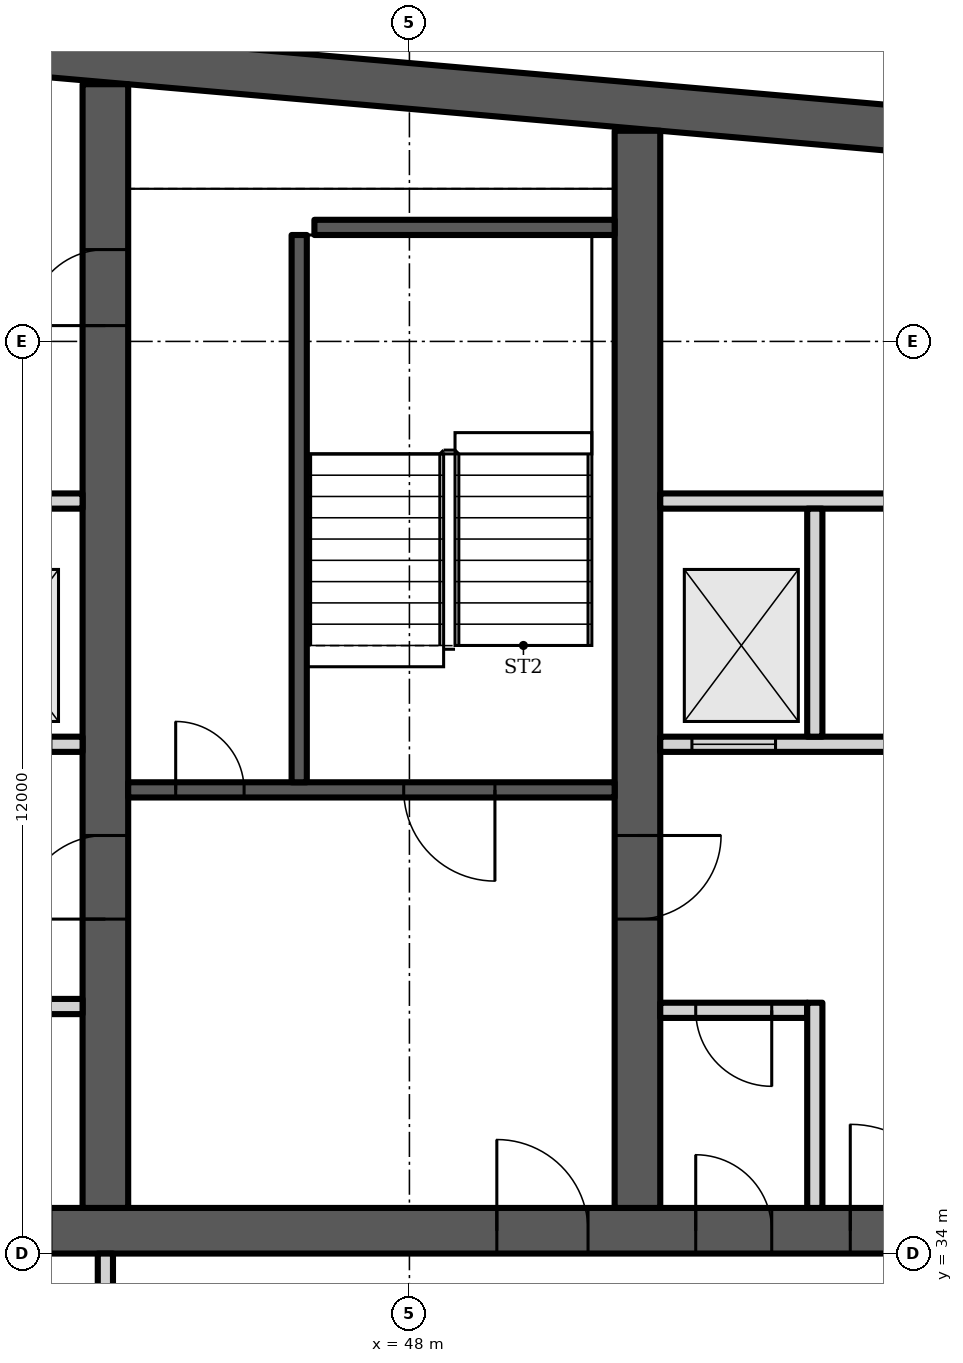
"""IFC4 building model, lengths in metres.
Left out: names, types, materials, properties, quantities, classifications, styles, units other than length and angle.
Written with IfcOpenShell. Run it as: python <this file> out.ifc"""

import sys

from ifc_helpers import new_model, si_unit, direction, frame, frame_2d, origin, place, context, subcontext, project, spatial, polyline, rectangle, outline, extrude, element, fill, save


model = new_model("IFC4")
c1 = context("Model", 3, precision=1e-05, world=origin(), true_north=direction((0.0, 1.0)))
c2 = subcontext(c1, "Body", "Model", "MODEL_VIEW")
j1 = project(units=[si_unit("LENGTHUNIT", "METRE"), si_unit("PLANEANGLEUNIT", "RADIAN")], contexts=[c1])
p1 = place(None, origin())
s1 = spatial("IfcSite", under=j1, at=p1, CompositionType="ELEMENT")
p2 = place(p1, origin())
s2 = spatial("IfcBuilding", under=s1, at=p2, CompositionType="ELEMENT")
p3 = place(p2, frame((0.0, 0.0, 232.3)))
s3 = spatial("IfcBuildingStorey", under=s2, at=p3, CompositionType="ELEMENT", Elevation=232.3)
p4 = place(p3, frame((0.0, 0.0, -0.0)))
e1 = element("IfcWall", 1, at=p4, inside=s3, PredefinedType="SHEAR", context=c2, shape_type="SweptSolid", body=[
    extrude(outline(polyline([(23.0, 48.185), (40.5, 49.716), (58.0, 48.185), (58.0, 48.787), (40.5, 50.318), (23.0, 48.787), (23.0, 48.185)])), origin(), (0.0, 0.0, 1.0), 3.6),
])
p5 = place(p3, frame((23.0, 34.3, 0.0), z_axis=(0.0, 0.0, 1.0), x_axis=(1.0, 0.0, 0.0)))
e2 = element("IfcWall", 2, at=p5, inside=s3, PredefinedType="SHEAR", context=c2, shape_type="SweptSolid", body=[
    extrude(rectangle(XDim=35.0, YDim=0.6, at=frame_2d((17.5, 0.0))), origin(), (0.0, 0.0, 1.0), 3.6),
])
p6 = place(p5, frame((0.65, 0.0, 0.0)))
e3 = element("IfcOpeningElement", 3, at=p6, cuts=e2, PredefinedType="OPENING", context=c2, shape_type="SweptSolid", body=[
    extrude(rectangle(XDim=1.2, YDim=2.1, at=frame_2d((0.6, 1.05))), frame((0.0, 0.31, 0.0), z_axis=(0.0, -1.0, 0.0), x_axis=(1.0, 0.0, 0.0)), (0.0, 0.0, 1.0), 0.62),
])
p7 = place(p5, frame((7.717, 0.0, 0.0)))
e4 = element("IfcOpeningElement", 4, at=p7, cuts=e2, PredefinedType="OPENING", context=c2, shape_type="SweptSolid", body=[
    extrude(rectangle(XDim=1.1, YDim=2.1, at=frame_2d((0.55, 1.05))), frame((0.0, 0.31, 0.0), z_axis=(0.0, -1.0, 0.0), x_axis=(1.0, 0.0, 0.0)), (0.0, 0.0, 1.0), 0.62),
])
p8 = place(p5, frame((12.183, 0.0, 0.0)))
e5 = element("IfcOpeningElement", 5, at=p8, cuts=e2, PredefinedType="OPENING", context=c2, shape_type="SweptSolid", body=[
    extrude(rectangle(XDim=1.1, YDim=2.1, at=frame_2d((0.55, 1.05))), frame((0.0, 0.31, 0.0), z_axis=(0.0, -1.0, 0.0), x_axis=(1.0, 0.0, 0.0)), (0.0, 0.0, 1.0), 0.62),
])
p9 = place(p5, frame((9.8, 0.0, 0.0)))
e6 = element("IfcOpeningElement", 6, at=p9, cuts=e2, PredefinedType="OPENING", context=c2, shape_type="SweptSolid", body=[
    extrude(rectangle(XDim=1.4, YDim=2.1, at=frame_2d((0.7, 1.05))), frame((0.0, 0.31, 0.0), z_axis=(0.0, -1.0, 0.0), x_axis=(1.0, 0.0, 0.0)), (0.0, 0.0, 1.0), 0.62),
])
p10 = place(p5, frame((14.717, 0.0, 0.0)))
e7 = element("IfcOpeningElement", 7, at=p10, cuts=e2, PredefinedType="OPENING", context=c2, shape_type="SweptSolid", body=[
    extrude(rectangle(XDim=1.1, YDim=2.1, at=frame_2d((0.55, 1.05))), frame((0.0, 0.31, 0.0), z_axis=(0.0, -1.0, 0.0), x_axis=(1.0, 0.0, 0.0)), (0.0, 0.0, 1.0), 0.62),
])
p11 = place(p5, frame((16.95, 0.0, 0.0)))
e8 = element("IfcOpeningElement", 8, at=p11, cuts=e2, PredefinedType="OPENING", context=c2, shape_type="SweptSolid", body=[
    extrude(rectangle(XDim=1.1, YDim=2.1, at=frame_2d((0.55, 1.05))), frame((0.0, 0.31, 0.0), z_axis=(0.0, -1.0, 0.0), x_axis=(1.0, 0.0, 0.0)), (0.0, 0.0, 1.0), 0.62),
])
p12 = place(p5, frame((19.183, 0.0, 0.0)))
e9 = element("IfcOpeningElement", 9, at=p12, cuts=e2, PredefinedType="OPENING", context=c2, shape_type="SweptSolid", body=[
    extrude(rectangle(XDim=1.1, YDim=2.1, at=frame_2d((0.55, 1.05))), frame((0.0, 0.31, 0.0), z_axis=(0.0, -1.0, 0.0), x_axis=(1.0, 0.0, 0.0)), (0.0, 0.0, 1.0), 0.62),
])
p13 = place(p5, frame((26.15, 0.0, 0.0)))
e10 = element("IfcOpeningElement", 10, at=p13, cuts=e2, PredefinedType="OPENING", context=c2, shape_type="SweptSolid", body=[
    extrude(rectangle(XDim=1.2, YDim=2.1, at=frame_2d((0.6, 1.05))), frame((0.0, 0.31, 0.0), z_axis=(0.0, -1.0, 0.0), x_axis=(1.0, 0.0, 0.0)), (0.0, 0.0, 1.0), 0.62),
])
p14 = place(p5, frame((28.767, 0.0, 0.0)))
e11 = element("IfcOpeningElement", 11, at=p14, cuts=e2, PredefinedType="OPENING", context=c2, shape_type="SweptSolid", body=[
    extrude(rectangle(XDim=1.0, YDim=2.1, at=frame_2d((0.5, 1.05))), frame((0.0, 0.31, 0.0), z_axis=(0.0, -1.0, 0.0), x_axis=(1.0, 0.0, 0.0)), (0.0, 0.0, 1.0), 0.62),
])
p15 = place(p5, frame((33.083, 0.0, 0.0)))
e12 = element("IfcOpeningElement", 12, at=p15, cuts=e2, PredefinedType="OPENING", context=c2, shape_type="SweptSolid", body=[
    extrude(rectangle(XDim=1.0, YDim=2.1, at=frame_2d((0.5, 1.05))), frame((0.0, 0.31, 0.0), z_axis=(0.0, -1.0, 0.0), x_axis=(1.0, 0.0, 0.0)), (0.0, 0.0, 1.0), 0.62),
])
p16 = place(p5, frame((30.8, 0.0, 0.0)))
e13 = element("IfcOpeningElement", 13, at=p16, cuts=e2, PredefinedType="OPENING", context=c2, shape_type="SweptSolid", body=[
    extrude(rectangle(XDim=1.4, YDim=2.1, at=frame_2d((0.7, 1.05))), frame((0.0, 0.31, 0.0), z_axis=(0.0, -1.0, 0.0), x_axis=(1.0, 0.0, 0.0)), (0.0, 0.0, 1.0), 0.62),
])
p17 = place(p3, frame((44.0, 34.6, 0.0), z_axis=(0.0, 0.0, 1.0), x_axis=(0.0, 1.0, 0.0)))
e14 = element("IfcWall", 14, at=p17, inside=s3, PredefinedType="SHEAR", context=c2, shape_type="SweptSolid", body=[
    extrude(rectangle(XDim=14.784, YDim=0.6, at=frame_2d((7.392, 0.0))), origin(), (0.0, 0.0, 1.0), 3.6),
])
p18 = place(p17, frame((11.608, 0.0, 0.0)))
e15 = element("IfcOpeningElement", 15, at=p18, cuts=e14, PredefinedType="OPENING", context=c2, shape_type="SweptSolid", body=[
    extrude(rectangle(XDim=1.0, YDim=2.1, at=frame_2d((0.5, 1.05))), frame((0.0, 0.31, 0.0), z_axis=(0.0, -1.0, 0.0), x_axis=(1.0, 0.0, 0.0)), (0.0, 0.0, 1.0), 0.62),
])
p19 = place(p17, frame((3.8, 0.0, 0.0)))
e16 = element("IfcOpeningElement", 16, at=p19, cuts=e14, PredefinedType="OPENING", context=c2, shape_type="SweptSolid", body=[
    extrude(rectangle(XDim=1.1, YDim=2.1, at=frame_2d((0.55, 1.05))), frame((0.0, 0.31, 0.0), z_axis=(0.0, -1.0, 0.0), x_axis=(1.0, 0.0, 0.0)), (0.0, 0.0, 1.0), 0.62),
])
p20 = place(p3, frame((51.0, 34.6, 0.0), z_axis=(0.0, 0.0, 1.0), x_axis=(0.0, 1.0, 0.0)))
e17 = element("IfcWall", 17, at=p20, inside=s3, PredefinedType="SHEAR", context=c2, shape_type="SweptSolid", body=[
    extrude(rectangle(XDim=14.171, YDim=0.6, at=frame_2d((7.085, 0.0))), origin(), (0.0, 0.0, 1.0), 3.6),
])
p21 = place(p20, frame((3.8, 0.0, 0.0)))
e18 = element("IfcOpeningElement", 18, at=p21, cuts=e17, PredefinedType="OPENING", context=c2, shape_type="SweptSolid", body=[
    extrude(rectangle(XDim=1.1, YDim=2.1, at=frame_2d((0.55, 1.05))), frame((0.0, 0.31, 0.0), z_axis=(0.0, -1.0, 0.0), x_axis=(1.0, 0.0, 0.0)), (0.0, 0.0, 1.0), 0.62),
])
p22 = place(p3, frame((37.3, 40.7, 0.0), z_axis=(0.0, 0.0, 1.0), x_axis=(1.0, 0.0, 0.0)))
e19 = element("IfcWall", 19, at=p22, inside=s3, PredefinedType="PARTITIONING", context=c2, shape_type="SweptSolid", body=[
    extrude(rectangle(XDim=6.4, YDim=0.2, at=frame_2d((3.2, 0.0))), origin(), (0.0, 0.0, 1.0), 3.2),
])
p23 = place(p22, frame((0.417, 0.0, 0.0)))
e20 = element("IfcOpeningElement", 20, at=p23, cuts=e19, PredefinedType="OPENING", context=c2, shape_type="SweptSolid", body=[
    extrude(rectangle(XDim=1.1, YDim=2.1, at=frame_2d((0.55, 1.05))), frame((0.0, 0.11, 0.0), z_axis=(0.0, -1.0, 0.0), x_axis=(1.0, 0.0, 0.0)), (0.0, 0.0, 1.0), 0.22),
])
p24 = place(p22, frame((2.65, 0.0, 0.0)))
e21 = element("IfcOpeningElement", 21, at=p24, cuts=e19, PredefinedType="OPENING", context=c2, shape_type="SweptSolid", body=[
    extrude(rectangle(XDim=1.1, YDim=2.1, at=frame_2d((0.55, 1.05))), frame((0.0, 0.11, 0.0), z_axis=(0.0, -1.0, 0.0), x_axis=(1.0, 0.0, 0.0)), (0.0, 0.0, 1.0), 0.22),
])
p25 = place(p22, frame((4.883, 0.0, 0.0)))
e22 = element("IfcOpeningElement", 22, at=p25, cuts=e19, PredefinedType="OPENING", context=c2, shape_type="SweptSolid", body=[
    extrude(rectangle(XDim=1.1, YDim=2.1, at=frame_2d((0.55, 1.05))), frame((0.0, 0.11, 0.0), z_axis=(0.0, -1.0, 0.0), x_axis=(1.0, 0.0, 0.0)), (0.0, 0.0, 1.0), 0.22),
])
p26 = place(p3, frame((0.0, 0.0, -0.0)))
e23 = element("IfcWall", 23, at=p26, inside=s3, PredefinedType="PARTITIONING", context=c2, shape_type="SweptSolid", body=[
    extrude(outline(polyline([(41.567, 37.1), (39.433, 37.1), (39.433, 34.6), (39.233, 34.6), (39.233, 37.45), (37.3, 37.45), (37.3, 37.65), (39.233, 37.65), (39.433, 37.65), (39.433, 37.3), (41.567, 37.3), (41.567, 37.35), (41.767, 37.35), (43.7, 37.35), (43.7, 37.15), (41.767, 37.15), (41.767, 34.6), (41.567, 34.6), (41.567, 37.1)])), origin(), (0.0, 0.0, 1.0), 3.2),
])
p27 = place(p3, frame((0.0, 0.0, -0.0)))
e24 = element("IfcWall", 24, at=p27, inside=s3, PredefinedType="PARTITIONING", context=c2, shape_type="SweptSolid", body=[
    extrude(outline(polyline([(39.433, 40.8), (39.233, 40.8), (39.233, 43.8), (37.3, 43.8), (37.3, 44.0), (43.7, 44.0), (43.7, 43.8), (41.767, 43.8), (41.767, 40.8), (41.567, 40.8), (41.567, 43.8), (39.433, 43.8), (39.433, 40.8)])), origin(), (0.0, 0.0, 1.0), 3.2),
])
p28 = place(p3, frame((44.3, 40.1, 0.0), z_axis=(0.0, 0.0, 1.0), x_axis=(1.0, 0.0, 0.0)))
e25 = element("IfcWall", 25, at=p28, inside=s3, PredefinedType="SHEAR", context=c2, shape_type="SweptSolid", body=[
    extrude(rectangle(XDim=6.4, YDim=0.2, at=frame_2d((3.2, 0.0))), origin(), (0.0, 0.0, 1.0), 3.2),
])
p29 = place(p28, frame((3.625, 0.0, 0.0)))
e26 = element("IfcOpeningElement", 26, at=p29, cuts=e25, PredefinedType="OPENING", context=c2, shape_type="SweptSolid", body=[
    extrude(rectangle(XDim=1.2, YDim=2.1, at=frame_2d((0.6, 1.05))), frame((0.0, 0.11, 0.0), z_axis=(0.0, -1.0, 0.0), x_axis=(1.0, 0.0, 0.0)), (0.0, 0.0, 1.0), 0.22),
])
p30 = place(p28, frame((0.625, 0.0, 0.0)))
e27 = element("IfcOpeningElement", 27, at=p30, cuts=e25, PredefinedType="OPENING", context=c2, shape_type="SweptSolid", body=[
    extrude(rectangle(XDim=0.9, YDim=2.1, at=frame_2d((0.45, 1.05))), frame((0.0, 0.11, 0.0), z_axis=(0.0, -1.0, 0.0), x_axis=(1.0, 0.0, 0.0)), (0.0, 0.0, 1.0), 0.22),
])
p31 = place(p3, frame((46.55, 40.2, 0.0), z_axis=(0.0, 0.0, 1.0), x_axis=(0.0, 1.0, 0.0)))
e28 = element("IfcWall", 28, at=p31, inside=s3, PredefinedType="SHEAR", context=c2, shape_type="SweptSolid", body=[
    extrude(rectangle(XDim=7.2, YDim=0.2, at=frame_2d((3.6, 0.0))), origin(), (0.0, 0.0, 1.0), 3.2),
])
p32 = place(p3, frame((46.75, 47.5, 0.0), z_axis=(0.0, 0.0, 1.0), x_axis=(1.0, 0.0, 0.0)))
e29 = element("IfcWall", 29, at=p32, inside=s3, PredefinedType="SHEAR", context=c2, shape_type="SweptSolid", body=[
    extrude(rectangle(XDim=3.95, YDim=0.2, at=frame_2d((1.975, 0.0))), origin(), (0.0, 0.0, 1.0), 3.2),
])
p33 = place(p3, frame((51.3, 37.2, 0.0), z_axis=(0.0, 0.0, 1.0), x_axis=(1.0, 0.0, 0.0)))
e30 = element("IfcWall", 30, at=p33, inside=s3, PredefinedType="PARTITIONING", context=c2, shape_type="SweptSolid", body=[
    extrude(rectangle(XDim=1.933, YDim=0.2, at=frame_2d((0.967, 0.0))), origin(), (0.0, 0.0, 1.0), 3.2),
])
p34 = place(p33, frame((0.467, 0.0, 0.0)))
e31 = element("IfcOpeningElement", 31, at=p34, cuts=e30, PredefinedType="OPENING", context=c2, shape_type="SweptSolid", body=[
    extrude(rectangle(XDim=1.0, YDim=2.1, at=frame_2d((0.5, 1.05))), frame((0.0, 0.11, 0.0), z_axis=(0.0, -1.0, 0.0), x_axis=(1.0, 0.0, 0.0)), (0.0, 0.0, 1.0), 0.22),
])
p35 = place(p3, frame((51.3, 40.7, 0.0), z_axis=(0.0, 0.0, 1.0), x_axis=(1.0, 0.0, 0.0)))
e32 = element("IfcWall", 32, at=p35, inside=s3, PredefinedType="PARTITIONING", context=c2, shape_type="SweptSolid", body=[
    extrude(rectangle(XDim=6.1, YDim=0.2, at=frame_2d((3.05, 0.0))), origin(), (0.0, 0.0, 1.0), 3.2),
])
p36 = place(p35, frame((0.417, 0.0, 0.0)))
e33 = element("IfcOpeningElement", 33, at=p36, cuts=e32, PredefinedType="OPENING", context=c2, shape_type="SweptSolid", body=[
    extrude(rectangle(XDim=1.1, YDim=2.1, at=frame_2d((0.55, 1.05))), frame((0.0, 0.11, 0.0), z_axis=(0.0, -1.0, 0.0), x_axis=(1.0, 0.0, 0.0)), (0.0, 0.0, 1.0), 0.22),
])
p37 = place(p35, frame((3.617, 0.0, 0.0)))
e34 = element("IfcOpeningElement", 34, at=p37, cuts=e32, PredefinedType="OPENING", context=c2, shape_type="SweptSolid", body=[
    extrude(rectangle(XDim=1.0, YDim=2.1, at=frame_2d((0.5, 1.05))), frame((0.0, 0.11, 0.0), z_axis=(0.0, -1.0, 0.0), x_axis=(1.0, 0.0, 0.0)), (0.0, 0.0, 1.0), 0.22),
])
p38 = place(p3, frame((51.3, 43.9, 0.0), z_axis=(0.0, 0.0, 1.0), x_axis=(1.0, 0.0, 0.0)))
e35 = element("IfcWall", 35, at=p38, inside=s3, PredefinedType="PARTITIONING", context=c2, shape_type="SweptSolid", body=[
    extrude(rectangle(XDim=6.1, YDim=0.2, at=frame_2d((3.05, 0.0))), origin(), (0.0, 0.0, 1.0), 3.2),
])
p39 = place(p38, frame((3.617, 0.0, 0.0)))
e36 = element("IfcOpeningElement", 36, at=p39, cuts=e35, PredefinedType="OPENING", context=c2, shape_type="SweptSolid", body=[
    extrude(rectangle(XDim=1.0, YDim=2.1, at=frame_2d((0.5, 1.05))), frame((0.0, 0.11, 0.0), z_axis=(0.0, -1.0, 0.0), x_axis=(1.0, 0.0, 0.0)), (0.0, 0.0, 1.0), 0.22),
])
p40 = place(p3, frame((0.0, 0.0, -0.0)))
e37 = element("IfcWall", 37, at=p40, inside=s3, PredefinedType="PARTITIONING", context=c2, shape_type="SweptSolid", body=[
    extrude(outline(polyline([(53.233, 34.6), (53.233, 37.3), (53.433, 37.3), (53.433, 34.6), (53.233, 34.6)])), origin(), (0.0, 0.0, 1.0), 3.2),
])
p41 = place(p3, frame((0.0, 0.0, -0.0)))
e38 = element("IfcWall", 38, at=p41, inside=s3, PredefinedType="PARTITIONING", context=c2, shape_type="SweptSolid", body=[
    extrude(outline(polyline([(53.433, 40.8), (53.433, 43.8), (53.233, 43.8), (53.233, 40.8), (53.433, 40.8)])), origin(), (0.0, 0.0, 1.0), 3.2),
])
p42 = place(p3, frame((44.0, 30.5, 0.0), z_axis=(0.0, 0.0, 1.0), x_axis=(0.0, 1.0, 0.0)))
e39 = element("IfcWall", 39, at=p42, inside=s3, PredefinedType="PARTITIONING", context=c2, shape_type="SweptSolid", body=[
    extrude(rectangle(XDim=3.5, YDim=0.2, at=frame_2d((1.75, 0.0))), origin(), (0.0, 0.0, 1.0), 3.2),
])
p43 = place(p42, frame((1.2, 0.0, 0.0)))
e40 = element("IfcOpeningElement", 40, at=p43, cuts=e39, PredefinedType="OPENING", context=c2, shape_type="SweptSolid", body=[
    extrude(rectangle(XDim=1.1, YDim=2.1, at=frame_2d((0.55, 1.05))), frame((0.0, 0.11, 0.0), z_axis=(0.0, -1.0, 0.0), x_axis=(1.0, 0.0, 0.0)), (0.0, 0.0, 1.0), 0.22),
])
p44 = place(p18, origin())
e41 = element("IfcDoor", 41, at=p44, inside=s3, OperationType="SINGLE_SWING_LEFT", PredefinedType="DOOR", context=c2, shape_type="SweptSolid", body=[
    extrude(rectangle(XDim=1.0, YDim=2.1, at=frame_2d((0.5, 1.05))), frame((0.0, 0.025, 0.0), z_axis=(0.0, -1.0, 0.0), x_axis=(1.0, 0.0, 0.0)), (0.0, 0.0, 1.0), 0.05),
])
fill(e15, e41)
p45 = place(p29, origin())
e42 = element("IfcDoor", 42, at=p45, inside=s3, OperationType="SINGLE_SWING_RIGHT", PredefinedType="DOOR", context=c2, shape_type="SweptSolid", body=[
    extrude(rectangle(XDim=1.2, YDim=2.1, at=frame_2d((0.6, 1.05))), frame((0.0, 0.025, 0.0), z_axis=(0.0, -1.0, 0.0), x_axis=(1.0, 0.0, 0.0)), (0.0, 0.0, 1.0), 0.05),
])
fill(e26, e42)
p46 = place(p30, origin())
e43 = element("IfcDoor", 43, at=p46, inside=s3, OperationType="SINGLE_SWING_LEFT", PredefinedType="DOOR", context=c2, shape_type="SweptSolid", body=[
    extrude(rectangle(XDim=0.9, YDim=2.1, at=frame_2d((0.45, 1.05))), frame((0.0, 0.025, 0.0), z_axis=(0.0, -1.0, 0.0), x_axis=(1.0, 0.0, 0.0)), (0.0, 0.0, 1.0), 0.05),
])
fill(e27, e43)
p47 = place(p13, origin())
e44 = element("IfcDoor", 44, at=p47, inside=s3, OperationType="SINGLE_SWING_LEFT", PredefinedType="DOOR", context=c2, shape_type="SweptSolid", body=[
    extrude(rectangle(XDim=1.2, YDim=2.1, at=frame_2d((0.6, 1.05))), frame((0.0, 0.025, 0.0), z_axis=(0.0, -1.0, 0.0), x_axis=(1.0, 0.0, 0.0)), (0.0, 0.0, 1.0), 0.05),
])
fill(e10, e44)
p48 = place(p14, origin())
e45 = element("IfcDoor", 45, at=p48, inside=s3, OperationType="SINGLE_SWING_LEFT", PredefinedType="DOOR", context=c2, shape_type="SweptSolid", body=[
    extrude(rectangle(XDim=1.0, YDim=2.1, at=frame_2d((0.5, 1.05))), frame((0.0, 0.025, 0.0), z_axis=(0.0, -1.0, 0.0), x_axis=(1.0, 0.0, 0.0)), (0.0, 0.0, 1.0), 0.05),
])
fill(e11, e45)
p49 = place(p34, origin())
e46 = element("IfcDoor", 46, at=p49, inside=s3, OperationType="SINGLE_SWING_RIGHT", PredefinedType="DOOR", context=c2, shape_type="SweptSolid", body=[
    extrude(rectangle(XDim=1.0, YDim=2.1, at=frame_2d((0.5, 1.05))), frame((0.0, 0.025, 0.0), z_axis=(0.0, -1.0, 0.0), x_axis=(1.0, 0.0, 0.0)), (0.0, 0.0, 1.0), 0.05),
])
fill(e31, e46)
p50 = place(p16, origin())
e47 = element("IfcDoor", 47, at=p50, inside=s3, OperationType="DOUBLE_DOOR_SINGLE_SWING", PredefinedType="DOOR", context=c2, shape_type="SweptSolid", body=[
    extrude(rectangle(XDim=1.4, YDim=2.1, at=frame_2d((0.7, 1.05))), frame((0.0, 0.025, 0.0), z_axis=(0.0, -1.0, 0.0), x_axis=(1.0, 0.0, 0.0)), (0.0, 0.0, 1.0), 0.05),
])
fill(e13, e47)
p51 = place(p36, origin())
e48 = element("IfcDoor", 48, at=p51, inside=s3, OperationType="DOUBLE_DOOR_SLIDING", PredefinedType="DOOR", context=c2, shape_type="SweptSolid", body=[
    extrude(rectangle(XDim=1.1, YDim=2.1, at=frame_2d((0.55, 1.05))), frame((0.0, 0.025, 0.0), z_axis=(0.0, -1.0, 0.0), x_axis=(1.0, 0.0, 0.0)), (0.0, 0.0, 1.0), 0.05),
])
fill(e33, e48)
p52 = place(p19, origin())
e49 = element("IfcDoor", 49, at=p52, inside=s3, OperationType="SINGLE_SWING_LEFT", PredefinedType="DOOR", context=c2, shape_type="SweptSolid", body=[
    extrude(rectangle(XDim=1.1, YDim=2.1, at=frame_2d((0.55, 1.05))), frame((0.0, 0.025, 0.0), z_axis=(0.0, -1.0, 0.0), x_axis=(1.0, 0.0, 0.0)), (0.0, 0.0, 1.0), 0.05),
])
fill(e16, e49)
p53 = place(p21, origin())
e50 = element("IfcDoor", 50, at=p53, inside=s3, OperationType="SINGLE_SWING_RIGHT", PredefinedType="DOOR", context=c2, shape_type="SweptSolid", body=[
    extrude(rectangle(XDim=1.1, YDim=2.1, at=frame_2d((0.55, 1.05))), frame((0.0, 0.025, 0.0), z_axis=(0.0, -1.0, 0.0), x_axis=(1.0, 0.0, 0.0)), (0.0, 0.0, 1.0), 0.05),
])
fill(e18, e50)
save(model, sys.argv[1])
